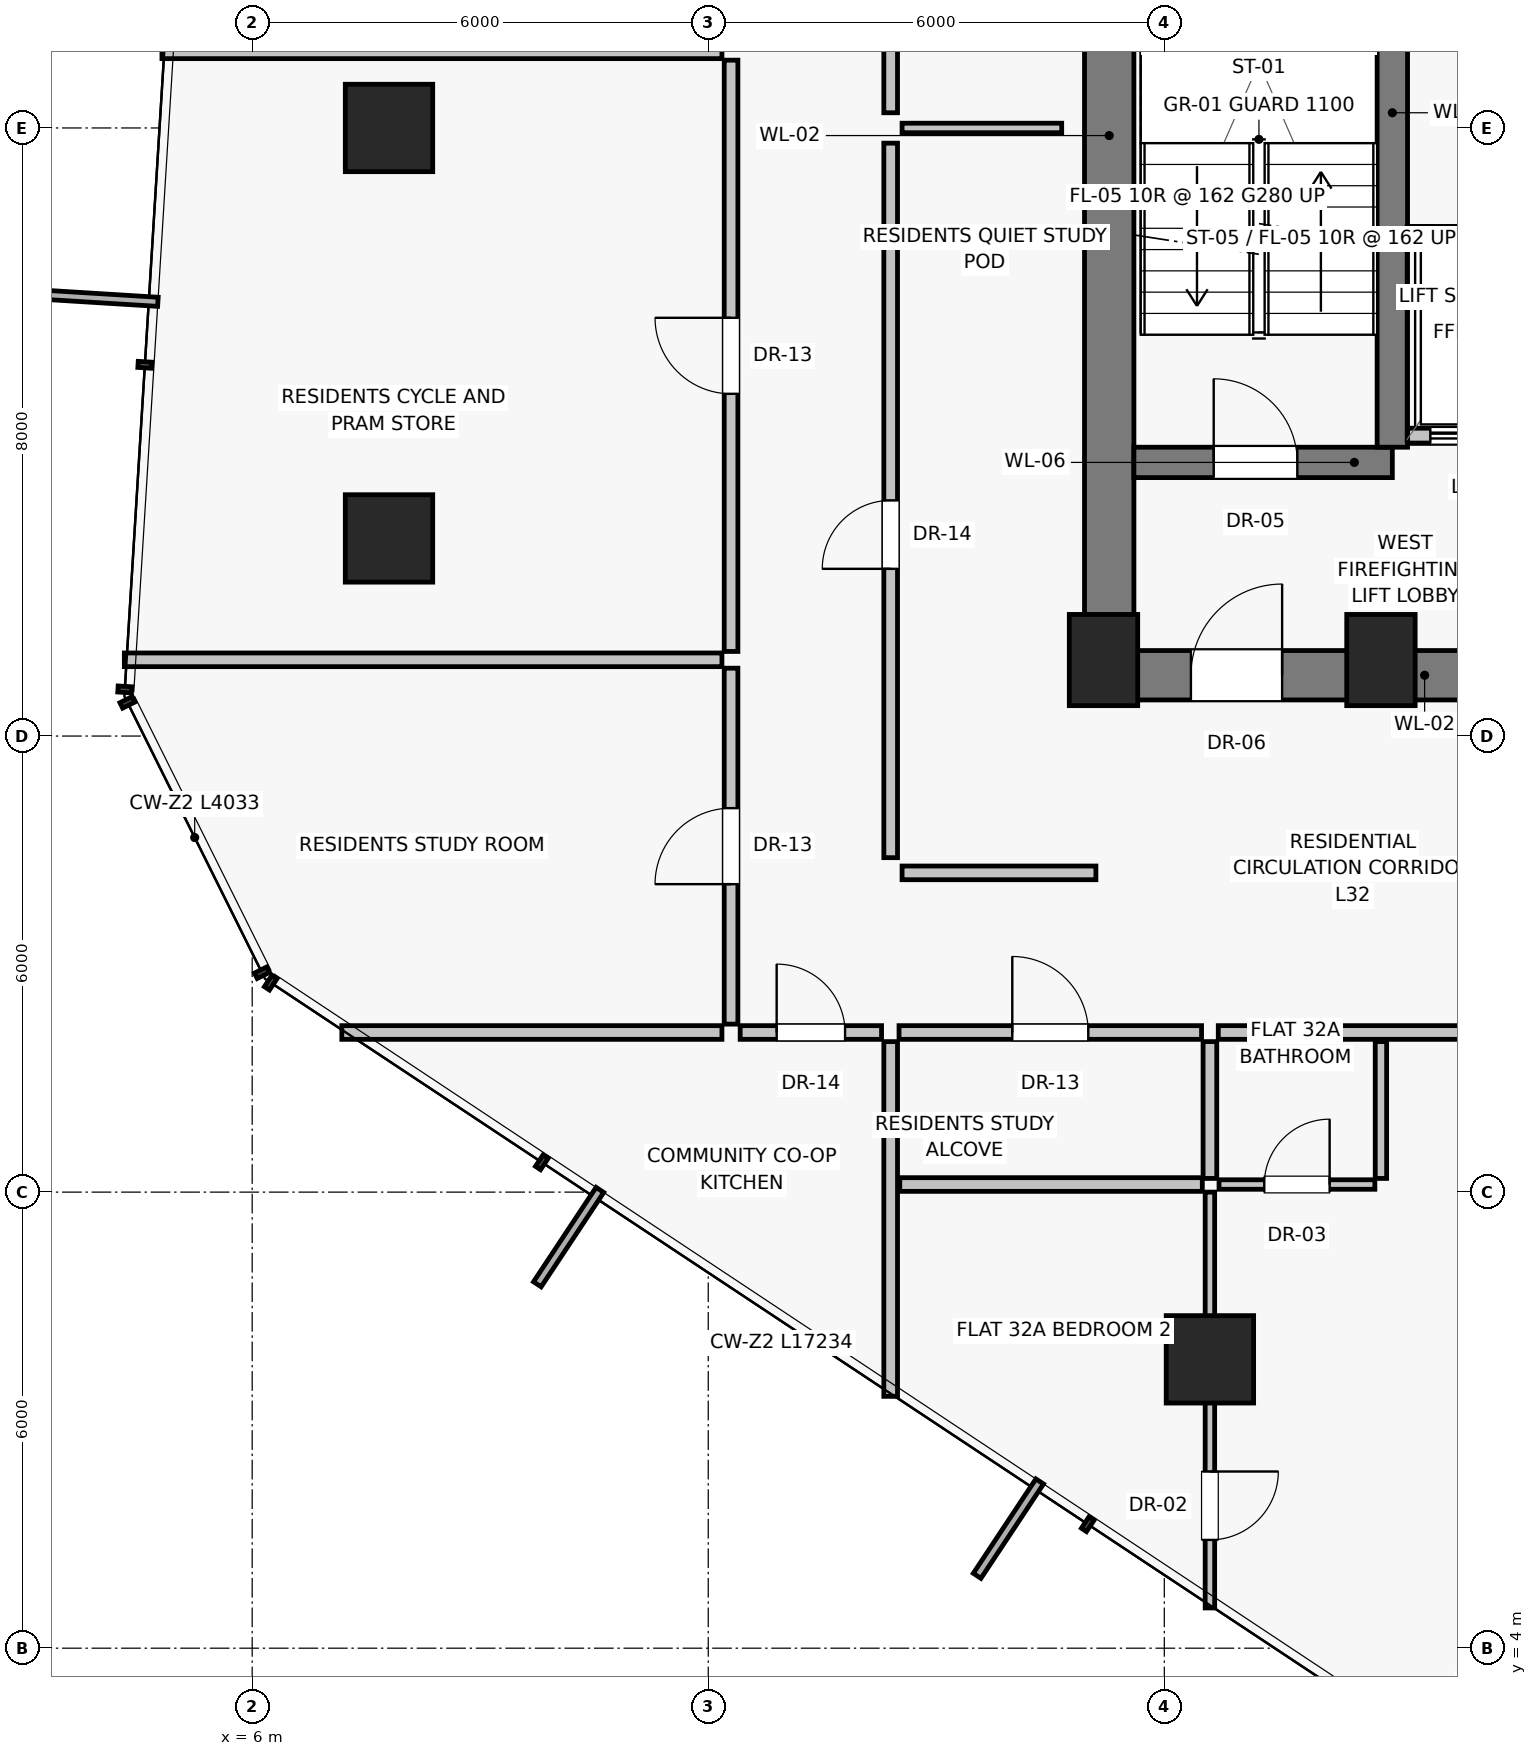
"""IFC4 building model, lengths in metres.
Left out: names, types, materials, properties, quantities, classifications, styles, units other than length and angle.
Written with IfcOpenShell. Run it as: python <this file> out.ifc"""

import sys

from ifc_helpers import new_model, si_unit, direction, frame, frame_2d, origin, origin_2d, place, context, subcontext, project, spatial, rectangle, extrude, source, transform, mapped, element, fill, save


model = new_model("IFC4")
c1 = context("Model", 3, precision=1e-05, world=origin(), true_north=direction((0.0, 1.0)))
c2 = subcontext(c1, "Body", "Model", "MODEL_VIEW")
j1 = project(units=[si_unit("LENGTHUNIT", "METRE"), si_unit("PLANEANGLEUNIT", "RADIAN")], contexts=[c1])
p1 = place(None, origin())
s1 = spatial("IfcSite", under=j1, at=p1, CompositionType="ELEMENT")
p2 = place(p1, origin())
s2 = spatial("IfcBuilding", under=s1, at=p2, CompositionType="ELEMENT")
p3 = place(p2, frame((0.0, 0.0, 116.5)))
s3 = spatial("IfcBuildingStorey", under=s2, at=p3, CompositionType="ELEMENT", Elevation=116.5)
for number, where, z_axis, x_axis in (
    (1, (17.2, 17.0, 0.0), (0.0, 0.0, 1.0), (1.0, 0.0, 0.0)),
    (2, (20.85, 17.0, 0.0), (0.0, 0.0, 1.0), (1.0, 0.0, 0.0)),
):
    element("IfcColumn", number, at=place(p3, frame(where, z_axis=z_axis, x_axis=x_axis)), inside=s3, PredefinedType="PILASTER", context=c2, shape_type="SweptSolid", body=[
        extrude(rectangle(XDim=0.9, YDim=1.2, at=origin_2d()), origin(), (0.0, 0.0, 1.0), 3.25),
    ])
for number, where, z_axis, x_axis in (
    (3, (7.8, 24.0, 0.0), (0.0, 0.0, 1.0), (1.0, 0.0, 0.0)),
    (4, (7.8, 18.6, 0.0), (0.0, 0.0, 1.0), (1.0, 0.0, 0.0)),
    (5, (18.6, 7.8, 0.0), (0.0, 0.0, 1.0), (1.0, 0.0, 0.0)),
):
    element("IfcColumn", number, at=place(p3, frame(where, z_axis=z_axis, x_axis=x_axis)), inside=s3, PredefinedType="COLUMN", context=c2, shape_type="SweptSolid", body=[
        extrude(rectangle(XDim=1.15, YDim=1.15, at=origin_2d()), origin(), (0.0, 0.0, 1.0), 3.25),
    ])
p4 = place(p3, frame((17.275, 16.8, 0.0), z_axis=(0.0, 0.0, 1.0), x_axis=(0.0, 1.0, 0.0)))
e6 = element("IfcWall", 6, at=p4, inside=s3, PredefinedType="SHEAR", context=c2, shape_type="SweptSolid", body=[
    extrude(rectangle(XDim=14.2, YDim=0.65, at=frame_2d((7.1, 0.0))), origin(), (0.0, 0.0, 1.0), 3.0),
])
p5 = place(p3, frame((17.2, 16.8, 0.0), z_axis=(0.0, 0.0, 1.0), x_axis=(1.0, 0.0, 0.0)))
e7 = element("IfcWall", 7, at=p5, inside=s3, PredefinedType="SHEAR", context=c2, shape_type="SweptSolid", body=[
    extrude(rectangle(XDim=5.85, YDim=0.65, at=frame_2d((2.925, 0.0))), origin(), (0.0, 0.0, 1.0), 3.0),
])
p6 = place(p5, frame((1.15, 0.0, 0.0)))
e8 = element("IfcOpeningElement", 8, at=p6, cuts=e7, PredefinedType="OPENING", context=c2, shape_type="SweptSolid", body=[
    extrude(rectangle(XDim=1.2, YDim=2.03, at=frame_2d((0.6, 1.015))), frame((0.0, 0.335, 0.0), z_axis=(0.0, -1.0, 0.0), x_axis=(1.0, 0.0, 0.0)), (0.0, 0.0, 1.0), 0.67),
])
p7 = place(p3, frame((17.6, 19.6, 0.0), z_axis=(0.0, 0.0, 1.0), x_axis=(1.0, 0.0, 0.0)))
e9 = element("IfcWall", 9, at=p7, inside=s3, PredefinedType="SHEAR", context=c2, shape_type="SweptSolid", body=[
    extrude(rectangle(XDim=3.4, YDim=0.4, at=frame_2d((1.7, 0.0))), origin(), (0.0, 0.0, 1.0), 3.0),
])
p8 = place(p7, frame((1.05, 0.0, 0.0)))
e10 = element("IfcOpeningElement", 10, at=p8, cuts=e9, PredefinedType="OPENING", context=c2, shape_type="SweptSolid", body=[
    extrude(rectangle(XDim=1.1, YDim=2.03, at=frame_2d((0.55, 1.015))), frame((0.0, 0.21, 0.0), z_axis=(0.0, -1.0, 0.0), x_axis=(1.0, 0.0, 0.0)), (0.0, 0.0, 1.0), 0.42),
])
p9 = place(p3, frame((21.2, 19.95, 0.0), z_axis=(0.0, 0.0, 1.0), x_axis=(1.0, 0.0, 0.0)))
e11 = element("IfcWall", 11, at=p9, inside=s3, PredefinedType="SOLIDWALL", context=c2, shape_type="SweptSolid", body=[
    extrude(rectangle(XDim=1.85, YDim=0.2, at=frame_2d((0.925, 0.0))), origin(), (0.0, 0.0, 1.0), 3.0),
])
p10 = place(p9, frame((0.3, 0.0, 0.0)))
e12 = element("IfcOpeningElement", 12, at=p10, cuts=e11, PredefinedType="OPENING", context=c2, shape_type="SweptSolid", body=[
    extrude(rectangle(XDim=1.3, YDim=2.25, at=frame_2d((0.65, 1.125))), frame((0.0, 0.11, 0.0), z_axis=(0.0, -1.0, 0.0), x_axis=(1.0, 0.0, 0.0)), (0.0, 0.0, 1.0), 0.22),
])
p11 = place(p3, frame((21.0, 19.8, 0.0), z_axis=(0.0, 0.0, 1.0), x_axis=(0.0, 1.0, 0.0)))
e13 = element("IfcWall", 13, at=p11, inside=s3, PredefinedType="SHEAR", context=c2, shape_type="SweptSolid", body=[
    extrude(rectangle(XDim=8.8, YDim=0.4, at=frame_2d((4.4, 0.0))), origin(), (0.0, 0.0, 1.0), 3.0),
])
p12 = place(p3, frame((21.2, 22.6, 0.0), z_axis=(0.0, 0.0, 1.0), x_axis=(1.0, 0.0, 0.0)))
e14 = element("IfcWall", 14, at=p12, inside=s3, PredefinedType="SOLIDWALL", context=c2, shape_type="SweptSolid", body=[
    extrude(rectangle(XDim=2.65, YDim=0.2, at=frame_2d((1.325, 0.0))), origin(), (0.0, 0.0, 1.0), 3.0),
])
p13 = place(p3, frame((14.4, 14.4, 0.0), z_axis=(0.0, 0.0, 1.0), x_axis=(0.0, 1.0, 0.0)))
e15 = element("IfcWall", 15, at=p13, inside=s3, PredefinedType="PARTITIONING", context=c2, shape_type="SweptSolid", body=[
    extrude(rectangle(XDim=9.4, YDim=0.18, at=frame_2d((4.7, 0.0))), origin(), (0.0, 0.0, 1.0), 3.0),
])
p14 = place(p13, frame((3.8, 0.0, 0.0)))
e16 = element("IfcOpeningElement", 16, at=p14, cuts=e15, PredefinedType="OPENING", context=c2, shape_type="SweptSolid", body=[
    extrude(rectangle(XDim=0.9, YDim=2.01, at=frame_2d((0.45, 1.005))), frame((0.0, 0.1, 0.0), z_axis=(0.0, -1.0, 0.0), x_axis=(1.0, 0.0, 0.0)), (0.0, 0.0, 1.0), 0.2),
])
p15 = place(p3, frame((14.4, 24.2, 0.0), z_axis=(0.0, 0.0, 1.0), x_axis=(0.0, 1.0, 0.0)))
e17 = element("IfcWall", 17, at=p15, inside=s3, PredefinedType="PARTITIONING", context=c2, shape_type="SweptSolid", body=[
    extrude(rectangle(XDim=9.2, YDim=0.18, at=frame_2d((4.6, 0.0))), origin(), (0.0, 0.0, 1.0), 3.0),
])
p16 = place(p15, frame((3.8, 0.0, 0.0)))
e18 = element("IfcOpeningElement", 18, at=p16, cuts=e17, PredefinedType="OPENING", context=c2, shape_type="SweptSolid", body=[
    extrude(rectangle(XDim=0.9, YDim=2.01, at=frame_2d((0.45, 1.005))), frame((0.0, 0.1, 0.0), z_axis=(0.0, -1.0, 0.0), x_axis=(1.0, 0.0, 0.0)), (0.0, 0.0, 1.0), 0.2),
])
p17 = place(p3, frame((14.55, 24.0, 0.0), z_axis=(0.0, 0.0, 1.0), x_axis=(1.0, 0.0, 0.0)))
e19 = element("IfcWall", 19, at=p17, inside=s3, PredefinedType="PARTITIONING", context=c2, shape_type="SweptSolid", body=[
    extrude(rectangle(XDim=2.1, YDim=0.125, at=frame_2d((1.05, 0.0))), origin(), (0.0, 0.0, 1.0), 3.0),
])
p18 = place(p3, frame((14.55, 14.2, 0.0), z_axis=(0.0, 0.0, 1.0), x_axis=(1.0, 0.0, 0.0)))
e20 = element("IfcWall", 20, at=p18, inside=s3, PredefinedType="PARTITIONING", context=c2, shape_type="SweptSolid", body=[
    extrude(rectangle(XDim=2.55, YDim=0.18, at=frame_2d((1.275, 0.0))), origin(), (0.0, 0.0, 1.0), 3.0),
])
p19 = place(p3, frame((14.4, 11.98, 0.0), z_axis=(0.0, 0.0, 1.0), x_axis=(0.0, -1.0, 0.0)))
e21 = element("IfcWall", 21, at=p19, inside=s3, PredefinedType="PARTITIONING", context=c2, shape_type="SweptSolid", body=[
    extrude(rectangle(XDim=4.667, YDim=0.18, at=frame_2d((2.333, 0.0))), origin(), (0.0, 0.0, 1.0), 3.0),
])
p20 = place(p3, frame((14.51, 12.1, 0.0), z_axis=(0.0, 0.0, 1.0), x_axis=(1.0, 0.0, 0.0)))
e22 = element("IfcWall", 22, at=p20, inside=s3, PredefinedType="PARTITIONING", context=c2, shape_type="SweptSolid", body=[
    extrude(rectangle(XDim=3.98, YDim=0.18, at=frame_2d((1.99, 0.0))), origin(), (0.0, 0.0, 1.0), 2.58),
])
p21 = place(p20, frame((1.49, 0.0, 0.0)))
e23 = element("IfcOpeningElement", 23, at=p21, cuts=e22, PredefinedType="OPENING", context=c2, shape_type="SweptSolid", body=[
    extrude(rectangle(XDim=1.0, YDim=2.01, at=frame_2d((0.5, 1.005))), frame((0.0, 0.1, 0.0), z_axis=(0.0, -1.0, 0.0), x_axis=(1.0, 0.0, 0.0)), (0.0, 0.0, 1.0), 0.2),
])
p22 = place(p3, frame((18.71, 12.1, 0.0), z_axis=(0.0, 0.0, 1.0), x_axis=(1.0, 0.0, 0.0)))
e24 = element("IfcWall", 24, at=p22, inside=s3, PredefinedType="PARTITIONING", context=c2, shape_type="SweptSolid", body=[
    extrude(rectangle(XDim=14.78, YDim=0.18, at=frame_2d((7.39, 0.0))), origin(), (0.0, 0.0, 1.0), 2.58),
])
p23 = place(p22, frame((5.94, 0.0, 0.0)))
e25 = element("IfcOpeningElement", 25, at=p23, cuts=e24, PredefinedType="OPENING", context=c2, shape_type="SweptSolid", body=[
    extrude(rectangle(XDim=0.95, YDim=2.02, at=frame_2d((0.475, 1.01))), frame((0.0, 0.1, 0.0), z_axis=(0.0, -1.0, 0.0), x_axis=(1.0, 0.0, 0.0)), (0.0, 0.0, 1.0), 0.2),
])
p24 = place(p3, frame((14.52, 10.1, 0.0), z_axis=(0.0, 0.0, 1.0), x_axis=(1.0, 0.0, 0.0)))
e26 = element("IfcWall", 26, at=p24, inside=s3, PredefinedType="PARTITIONING", context=c2, shape_type="SweptSolid", body=[
    extrude(rectangle(XDim=3.98, YDim=0.18, at=frame_2d((1.99, 0.0))), origin(), (0.0, 0.0, 1.0), 3.0),
])
p25 = place(p3, frame((18.6, 11.98, 0.0), z_axis=(0.0, 0.0, 1.0), x_axis=(0.0, -1.0, 0.0)))
e27 = element("IfcWall", 27, at=p25, inside=s3, PredefinedType="PARTITIONING", context=c2, shape_type="SweptSolid", body=[
    extrude(rectangle(XDim=1.8, YDim=0.18, at=frame_2d((0.9, 0.0))), origin(), (0.0, 0.0, 1.0), 2.378),
])
p26 = place(p3, frame((18.6, 10.0, 0.0), z_axis=(0.0, 0.0, 1.0), x_axis=(0.0, -1.0, 0.0)))
e28 = element("IfcWall", 28, at=p26, inside=s3, PredefinedType="PARTITIONING", context=c2, shape_type="SweptSolid", body=[
    extrude(rectangle(XDim=5.471, YDim=0.125, at=frame_2d((2.735, 0.0))), origin(), (0.0, 0.0, 1.0), 2.378),
])
p27 = place(p26, frame((3.676, 0.0, 0.0)))
e29 = element("IfcOpeningElement", 29, at=p27, cuts=e28, PredefinedType="OPENING", context=c2, shape_type="SweptSolid", body=[
    extrude(rectangle(XDim=0.9, YDim=2.01, at=frame_2d((0.45, 1.005))), frame((0.0, 0.073, 0.0), z_axis=(0.0, -1.0, 0.0), x_axis=(1.0, 0.0, 0.0)), (0.0, 0.0, 1.0), 0.145),
])
p28 = place(p3, frame((20.85, 11.98, 0.0), z_axis=(0.0, 0.0, 1.0), x_axis=(0.0, -1.0, 0.0)))
e30 = element("IfcWall", 30, at=p28, inside=s3, PredefinedType="PARTITIONING", context=c2, shape_type="SweptSolid", body=[
    extrude(rectangle(XDim=1.8, YDim=0.15, at=frame_2d((0.9, 0.0))), origin(), (0.0, 0.0, 1.0), 3.0),
])
p29 = place(p3, frame((18.72, 10.1, 0.0), z_axis=(0.0, 0.0, 1.0), x_axis=(1.0, 0.0, 0.0)))
e31 = element("IfcWall", 31, at=p29, inside=s3, PredefinedType="PARTITIONING", context=c2, shape_type="SweptSolid", body=[
    extrude(rectangle(XDim=2.05, YDim=0.125, at=frame_2d((1.025, 0.0))), origin(), (0.0, 0.0, 1.0), 3.0),
])
p30 = place(p29, frame((0.595, 0.0, 0.0)))
e32 = element("IfcOpeningElement", 32, at=p30, cuts=e31, PredefinedType="OPENING", context=c2, shape_type="SweptSolid", body=[
    extrude(rectangle(XDim=0.86, YDim=2.01, at=frame_2d((0.43, 1.005))), frame((0.0, 0.073, 0.0), z_axis=(0.0, -1.0, 0.0), x_axis=(1.0, 0.0, 0.0)), (0.0, 0.0, 1.0), 0.145),
])
p31 = place(p3, frame((12.18, 12.1, 0.0), z_axis=(0.0, 0.0, 1.0), x_axis=(-1.0, 0.0, 0.0)))
e33 = element("IfcWall", 33, at=p31, inside=s3, PredefinedType="PARTITIONING", context=c2, shape_type="SweptSolid", body=[
    extrude(rectangle(XDim=5.001, YDim=0.18, at=frame_2d((2.5, 0.0))), origin(), (0.0, 0.0, 1.0), 3.0),
])
p32 = place(p3, frame((12.3, 12.21, 0.0), z_axis=(0.0, 0.0, 1.0), x_axis=(0.0, 1.0, 0.0)))
e34 = element("IfcWall", 34, at=p32, inside=s3, PredefinedType="PARTITIONING", context=c2, shape_type="SweptSolid", body=[
    extrude(rectangle(XDim=4.683, YDim=0.18, at=frame_2d((2.342, 0.0))), origin(), (0.0, 0.0, 1.0), 3.0),
])
p33 = place(p32, frame((1.842, 0.0, 0.0)))
e35 = element("IfcOpeningElement", 35, at=p33, cuts=e34, PredefinedType="OPENING", context=c2, shape_type="SweptSolid", body=[
    extrude(rectangle(XDim=1.0, YDim=2.01, at=frame_2d((0.5, 1.005))), frame((0.0, 0.1, 0.0), z_axis=(0.0, -1.0, 0.0), x_axis=(1.0, 0.0, 0.0)), (0.0, 0.0, 1.0), 0.2),
])
p34 = place(p3, frame((12.3, 17.113, 0.0), z_axis=(0.0, 0.0, 1.0), x_axis=(0.0, 1.0, 0.0)))
e36 = element("IfcWall", 36, at=p34, inside=s3, PredefinedType="PARTITIONING", context=c2, shape_type="SweptSolid", body=[
    extrude(rectangle(XDim=7.779, YDim=0.18, at=frame_2d((3.89, 0.0))), origin(), (0.0, 0.0, 1.0), 2.58),
])
p35 = place(p34, frame((3.389, 0.0, 0.0)))
e37 = element("IfcOpeningElement", 37, at=p35, cuts=e36, PredefinedType="OPENING", context=c2, shape_type="SweptSolid", body=[
    extrude(rectangle(XDim=1.0, YDim=2.01, at=frame_2d((0.5, 1.005))), frame((0.0, 0.1, 0.0), z_axis=(0.0, -1.0, 0.0), x_axis=(1.0, 0.0, 0.0)), (0.0, 0.0, 1.0), 0.2),
])
p36 = place(p3, frame((12.18, 17.003, 0.0), z_axis=(0.0, 0.0, 1.0), x_axis=(-1.0, 0.0, 0.0)))
e38 = element("IfcWall", 38, at=p36, inside=s3, PredefinedType="PARTITIONING", context=c2, shape_type="SweptSolid", body=[
    extrude(rectangle(XDim=7.862, YDim=0.18, at=frame_2d((3.931, 0.0))), origin(), (0.0, 0.0, 1.0), 3.0),
])
p37 = place(p3, frame((12.18, 25.002, 0.0), z_axis=(0.0, 0.0, 1.0), x_axis=(-1.0, 0.0, 0.0)))
e39 = element("IfcWall", 39, at=p37, inside=s3, PredefinedType="PARTITIONING", context=c2, shape_type="SweptSolid", body=[
    extrude(rectangle(XDim=7.367, YDim=0.18, at=frame_2d((3.684, 0.0))), origin(), (0.0, 0.0, 1.0), 3.0),
])
p38 = place(p3, frame((12.42, 12.1, 0.0), z_axis=(0.0, 0.0, 1.0), x_axis=(1.0, 0.0, 0.0)))
e40 = element("IfcWall", 40, at=p38, inside=s3, PredefinedType="PARTITIONING", context=c2, shape_type="SweptSolid", body=[
    extrude(rectangle(XDim=1.86, YDim=0.18, at=frame_2d((0.93, 0.0))), origin(), (0.0, 0.0, 1.0), 3.0),
])
p39 = place(p38, frame((0.48, 0.0, 0.0)))
e41 = element("IfcOpeningElement", 41, at=p39, cuts=e40, PredefinedType="OPENING", context=c2, shape_type="SweptSolid", body=[
    extrude(rectangle(XDim=0.9, YDim=2.01, at=frame_2d((0.45, 1.005))), frame((0.0, 0.1, 0.0), z_axis=(0.0, -1.0, 0.0), x_axis=(1.0, 0.0, 0.0)), (0.0, 0.0, 1.0), 0.2),
])
m1 = source(origin(), c2, "Body", "SweptSolid", [
    extrude(rectangle(XDim=1.2, YDim=2.03, at=frame_2d((0.6, 1.015))), frame((0.0, 0.025, 0.0), z_axis=(0.0, -1.0, 0.0), x_axis=(1.0, 0.0, 0.0)), (0.0, 0.0, 1.0), 0.05),
])
p40 = place(p6, origin())
e42 = element("IfcDoor", 42, at=p40, inside=s3, OperationType="SINGLE_SWING_RIGHT", PredefinedType="DOOR", context=c2, shape_type="MappedRepresentation", body=[
    mapped(m1, transform((0.0, 0.0, 0.0), scale=1.0)),
])
fill(e8, e42)
m2 = source(origin(), c2, "Body", "SweptSolid", [
    extrude(rectangle(XDim=1.1, YDim=2.03, at=frame_2d((0.55, 1.015))), frame((0.0, 0.025, 0.0), z_axis=(0.0, -1.0, 0.0), x_axis=(1.0, 0.0, 0.0)), (0.0, 0.0, 1.0), 0.05),
])
p41 = place(p8, origin())
e43 = element("IfcDoor", 43, at=p41, inside=s3, OperationType="SINGLE_SWING_LEFT", PredefinedType="DOOR", context=c2, shape_type="MappedRepresentation", body=[
    mapped(m2, transform((0.0, 0.0, 0.0), scale=1.0)),
])
fill(e10, e43)
m3 = source(origin(), c2, "Body", "SweptSolid", [
    extrude(rectangle(XDim=1.3, YDim=2.25, at=frame_2d((0.65, 1.125))), frame((0.0, 0.025, 0.0), z_axis=(0.0, -1.0, 0.0), x_axis=(1.0, 0.0, 0.0)), (0.0, 0.0, 1.0), 0.05),
])
p42 = place(p10, origin())
e44 = element("IfcDoor", 44, at=p42, inside=s3, OperationType="SLIDING_TO_LEFT", PredefinedType="DOOR", context=c2, shape_type="MappedRepresentation", body=[
    mapped(m3, transform((0.0, 0.0, 0.0), scale=1.0)),
])
fill(e12, e44)
m4 = source(origin(), c2, "Body", "SweptSolid", [
    extrude(rectangle(XDim=0.9, YDim=2.01, at=frame_2d((0.45, 1.005))), frame((0.0, 0.025, 0.0), z_axis=(0.0, -1.0, 0.0), x_axis=(1.0, 0.0, 0.0)), (0.0, 0.0, 1.0), 0.05),
])
p43 = place(p14, origin())
e45 = element("IfcDoor", 45, at=p43, inside=s3, OperationType="SINGLE_SWING_LEFT", PredefinedType="DOOR", context=c2, shape_type="MappedRepresentation", body=[
    mapped(m4, transform((0.0, 0.0, 0.0), scale=1.0)),
])
fill(e16, e45)
m5 = source(origin(), c2, "Body", "SweptSolid", [
    extrude(rectangle(XDim=1.0, YDim=2.01, at=frame_2d((0.5, 1.005))), frame((0.0, 0.025, 0.0), z_axis=(0.0, -1.0, 0.0), x_axis=(1.0, 0.0, 0.0)), (0.0, 0.0, 1.0), 0.05),
])
p44 = place(p21, origin())
e46 = element("IfcDoor", 46, at=p44, inside=s3, OperationType="SINGLE_SWING_LEFT", PredefinedType="DOOR", context=c2, shape_type="MappedRepresentation", body=[
    mapped(m5, transform((0.0, 0.0, 0.0), scale=1.0)),
])
fill(e23, e46)
p45 = place(p27, origin())
e47 = element("IfcDoor", 47, at=p45, inside=s3, OperationType="SINGLE_SWING_LEFT", PredefinedType="DOOR", context=c2, shape_type="MappedRepresentation", body=[
    mapped(m4, transform((0.0, 0.0, 0.0), scale=1.0)),
])
fill(e29, e47)
m6 = source(origin(), c2, "Body", "SweptSolid", [
    extrude(rectangle(XDim=0.86, YDim=2.01, at=frame_2d((0.43, 1.005))), frame((0.0, 0.025, 0.0), z_axis=(0.0, -1.0, 0.0), x_axis=(1.0, 0.0, 0.0)), (0.0, 0.0, 1.0), 0.05),
])
p46 = place(p30, origin())
e48 = element("IfcDoor", 48, at=p46, inside=s3, OperationType="SINGLE_SWING_RIGHT", PredefinedType="DOOR", context=c2, shape_type="MappedRepresentation", body=[
    mapped(m6, transform((0.0, 0.0, 0.0), scale=1.0)),
])
fill(e32, e48)
p47 = place(p33, origin())
e49 = element("IfcDoor", 49, at=p47, inside=s3, OperationType="SINGLE_SWING_LEFT", PredefinedType="DOOR", context=c2, shape_type="MappedRepresentation", body=[
    mapped(m5, transform((0.0, 0.0, 0.0), scale=1.0)),
])
fill(e35, e49)
p48 = place(p35, origin())
e50 = element("IfcDoor", 50, at=p48, inside=s3, OperationType="SINGLE_SWING_RIGHT", PredefinedType="DOOR", context=c2, shape_type="MappedRepresentation", body=[
    mapped(m5, transform((0.0, 0.0, 0.0), scale=1.0)),
])
fill(e37, e50)
p49 = place(p39, origin())
e51 = element("IfcDoor", 51, at=p49, inside=s3, OperationType="SINGLE_SWING_LEFT", PredefinedType="DOOR", context=c2, shape_type="MappedRepresentation", body=[
    mapped(m4, transform((0.0, 0.0, 0.0), scale=1.0)),
])
fill(e41, e51)
save(model, sys.argv[1])
